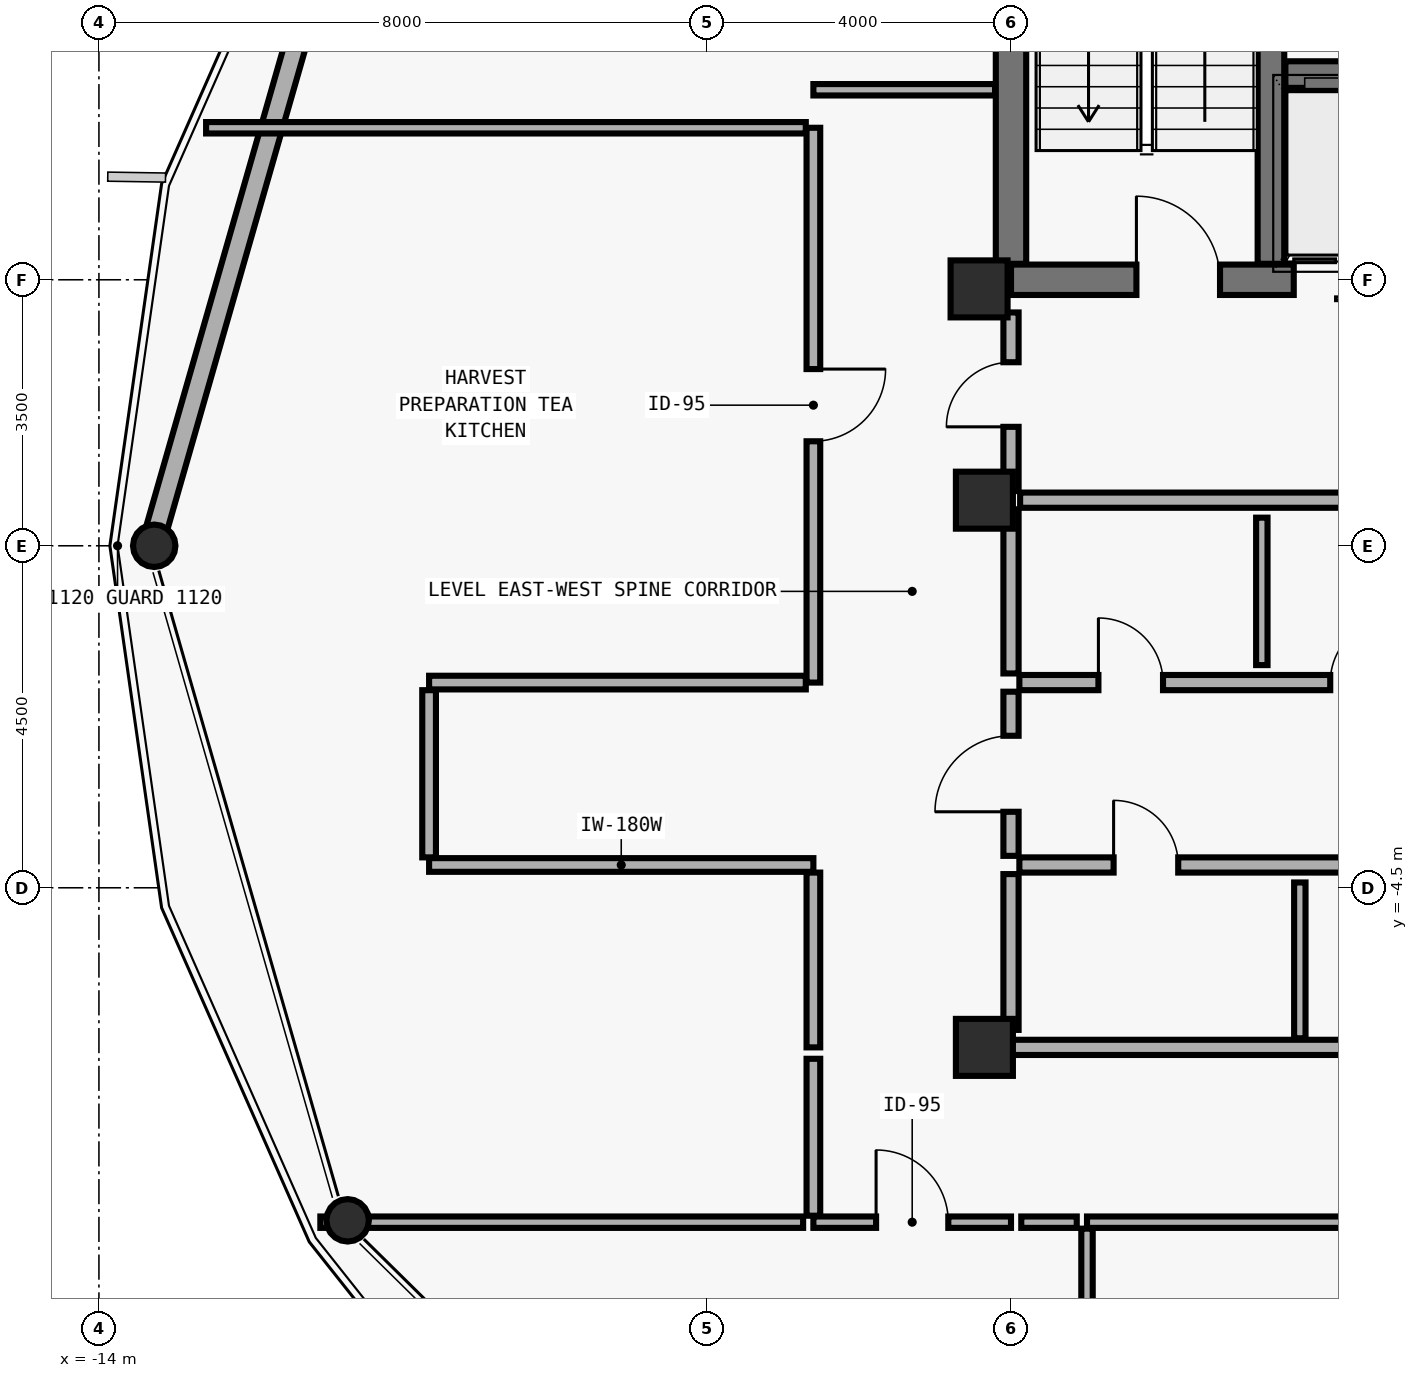
"""IFC4 building model, lengths in metres.
Left out: names, types, materials, properties, quantities, classifications, styles, units other than length and angle.
Written with IfcOpenShell. Run it as: python <this file> out.ifc"""

import sys

from ifc_helpers import new_model, si_unit, direction, frame, frame_2d, origin, origin_2d, place, context, subcontext, project, spatial, rectangle, hollow_circle, extrude, element, fill, save


model = new_model("IFC4")
c1 = context("Model", 3, precision=1e-05, world=origin(), true_north=direction((0.0, 1.0)))
c2 = subcontext(c1, "Body", "Model", "MODEL_VIEW")
j1 = project(units=[si_unit("LENGTHUNIT", "METRE"), si_unit("PLANEANGLEUNIT", "RADIAN")], contexts=[c1])
p1 = place(None, origin())
s1 = spatial("IfcSite", under=j1, at=p1, CompositionType="ELEMENT")
p2 = place(p1, origin())
s2 = spatial("IfcBuilding", under=s1, at=p2, CompositionType="ELEMENT")
p3 = place(p2, frame((0.0, 0.0, 267.0)))
s3 = spatial("IfcBuildingStorey", under=s2, at=p3, CompositionType="ELEMENT", Elevation=267.0)
p4 = place(p3, frame((-2.0, 3.5, 0.0), z_axis=(0.0, 0.0, 1.0), x_axis=(1.0, 0.0, 0.0)))
e1 = element("IfcWall", 1, at=p4, inside=s3, PredefinedType="SHEAR", context=c2, shape_type="SweptSolid", body=[
    extrude(rectangle(XDim=10.0, YDim=0.4, at=frame_2d((5.0, 0.0))), origin(), (0.0, 0.0, 1.0), 3.592),
])
p5 = place(p4, frame((1.65, 0.0, 0.0)))
e2 = element("IfcOpeningElement", 2, at=p5, cuts=e1, PredefinedType="OPENING", context=c2, shape_type="SweptSolid", body=[
    extrude(rectangle(XDim=1.1, YDim=2.15, at=frame_2d((0.55, 1.075))), frame((0.0, 0.21, 0.0), z_axis=(0.0, -1.0, 0.0), x_axis=(1.0, 0.0, 0.0)), (0.0, 0.0, 1.0), 0.42),
])
p6 = place(p4, frame((7.65, 0.0, 0.0)))
e3 = element("IfcOpeningElement", 3, at=p6, cuts=e1, PredefinedType="OPENING", context=c2, shape_type="SweptSolid", body=[
    extrude(rectangle(XDim=1.1, YDim=2.15, at=frame_2d((0.55, 1.075))), frame((0.0, 0.21, 0.0), z_axis=(0.0, -1.0, 0.0), x_axis=(1.0, 0.0, 0.0)), (0.0, 0.0, 1.0), 0.42),
])
p7 = place(p4, frame((3.72, 0.0, 0.0)))
e4 = element("IfcOpeningElement", 4, at=p7, cuts=e1, PredefinedType="OPENING", context=c2, shape_type="SweptSolid", body=[
    extrude(rectangle(XDim=1.1, YDim=2.2, at=frame_2d((0.55, 1.1))), frame((0.0, 0.21, 0.0), z_axis=(0.0, -1.0, 0.0), x_axis=(1.0, 0.0, 0.0)), (0.0, 0.0, 1.0), 0.42),
])
p8 = place(p4, frame((5.18, 0.0, 0.0)))
e5 = element("IfcOpeningElement", 5, at=p8, cuts=e1, PredefinedType="OPENING", context=c2, shape_type="SweptSolid", body=[
    extrude(rectangle(XDim=1.1, YDim=2.2, at=frame_2d((0.55, 1.1))), frame((0.0, 0.21, 0.0), z_axis=(0.0, -1.0, 0.0), x_axis=(1.0, 0.0, 0.0)), (0.0, 0.0, 1.0), 0.42),
])
p9 = place(p3, frame((-2.0, 3.71, 0.0), z_axis=(0.0, 0.0, 1.0), x_axis=(0.0, 1.0, 0.0)))
e6 = element("IfcWall", 6, at=p9, inside=s3, PredefinedType="SHEAR", context=c2, shape_type="SweptSolid", body=[
    extrude(rectangle(XDim=8.58, YDim=0.4, at=frame_2d((4.29, 0.0))), origin(), (0.0, 0.0, 1.0), 3.592),
])
p10 = place(p3, frame((1.42, 3.71, 0.0), z_axis=(0.0, 0.0, 1.0), x_axis=(0.0, 1.0, 0.0)))
e7 = element("IfcWall", 7, at=p10, inside=s3, PredefinedType="SHEAR", context=c2, shape_type="SweptSolid", body=[
    extrude(rectangle(XDim=8.58, YDim=0.35, at=frame_2d((4.29, 0.0))), origin(), (0.0, 0.0, 1.0), 3.592),
])
p11 = place(p3, frame((1.61, 6.2, 0.0), z_axis=(0.0, 0.0, 1.0), x_axis=(1.0, 0.0, 0.0)))
e8 = element("IfcWall", 8, at=p11, inside=s3, PredefinedType="SHEAR", context=c2, shape_type="SweptSolid", body=[
    extrude(rectangle(XDim=2.78, YDim=0.35, at=frame_2d((1.39, 0.0))), origin(), (0.0, 0.0, 1.0), 3.592),
])
for number, where, z_axis, x_axis in (
    (9, (-2.42, 3.38, 0.0), (0.0, 0.0, 1.0), (1.0, 0.0, 0.0)),
    (10, (-2.35, 0.6, 0.0), (0.0, 0.0, 1.0), (1.0, 0.0, 0.0)),
    (11, (-2.35, -6.6, 0.0), (0.0, 0.0, 1.0), (1.0, 0.0, 0.0)),
):
    element("IfcColumn", number, at=place(p3, frame(where, z_axis=z_axis, x_axis=x_axis)), inside=s3, PredefinedType="COLUMN", context=c2, shape_type="SweptSolid", body=[
        extrude(rectangle(XDim=0.75, YDim=0.75, at=origin_2d()), origin(), (0.0, 0.0, 1.0), 3.575),
    ])
p12 = place(p3, frame((-13.306, 0.0, 0.0), z_axis=(0.018708737519, 0.0, 0.999824976254), x_axis=(0.0, 1.0, 0.0)))
e12 = element("IfcColumn", 12, at=p12, inside=s3, PredefinedType="COLUMN", context=c2, shape_type="SweptSolid", body=[
    extrude(hollow_circle(Radius=0.28, WallThickness=0.02, at=origin_2d()), origin(), (0.0, 0.0, 1.0), 3.576),
])
p13 = place(p3, frame((-10.757, -8.884, 0.0), z_axis=(0.016251167856, 0.004779755252, 0.999856516448), x_axis=(-0.282166323992, 0.959365501571, 0.0)))
e13 = element("IfcColumn", 13, at=p13, inside=s3, PredefinedType="COLUMN", context=c2, shape_type="SweptSolid", body=[
    extrude(hollow_circle(Radius=0.28, WallThickness=0.02, at=origin_2d()), origin(), (0.0, 0.0, 1.0), 3.575),
])
p14 = place(p3, frame((-13.241, 0.225, 0.0), z_axis=(0.0, 0.0, 1.0), x_axis=(0.275816158288, 0.961210407157, 0.0)))
e14 = element("IfcWall", 14, at=p14, inside=s3, PredefinedType="SOLIDWALL", context=c2, shape_type="SweptSolid", body=[
    extrude(rectangle(XDim=8.774, YDim=0.28, at=frame_2d((4.387, 0.0))), origin(), (0.0, 0.0, 1.0), 2.97),
])
p15 = place(p3, frame((-2.0, 0.72, 0.0), z_axis=(0.0, 0.0, 1.0), x_axis=(0.0, 1.0, 0.0)))
e15 = element("IfcWall", 15, at=p15, inside=s3, PredefinedType="MOVABLE", context=c2, shape_type="SweptSolid", body=[
    extrude(rectangle(XDim=2.35, YDim=0.2, at=frame_2d((1.175, 0.0))), origin(), (0.0, 0.0, 1.0), 2.692),
])
p16 = place(p15, frame((0.845, 0.0, 0.0)))
e16 = element("IfcOpeningElement", 16, at=p16, cuts=e15, PredefinedType="OPENING", context=c2, shape_type="SweptSolid", body=[
    extrude(rectangle(XDim=0.85, YDim=2.1, at=frame_2d((0.425, 1.05))), frame((0.0, 0.11, 0.0), z_axis=(0.0, -1.0, 0.0), x_axis=(1.0, 0.0, 0.0)), (0.0, 0.0, 1.0), 0.22),
])
p17 = place(p3, frame((-2.0, -4.08, 0.0), z_axis=(0.0, 0.0, 1.0), x_axis=(0.0, 1.0, 0.0)))
e17 = element("IfcWall", 17, at=p17, inside=s3, PredefinedType="MOVABLE", context=c2, shape_type="SweptSolid", body=[
    extrude(rectangle(XDim=2.16, YDim=0.2, at=frame_2d((1.08, 0.0))), origin(), (0.0, 0.0, 1.0), 3.072),
])
p18 = place(p17, frame((0.58, 0.0, 0.0)))
e18 = element("IfcOpeningElement", 18, at=p18, cuts=e17, PredefinedType="OPENING", context=c2, shape_type="SweptSolid", body=[
    extrude(rectangle(XDim=1.0, YDim=2.1, at=frame_2d((0.5, 1.05))), frame((0.0, 0.11, 0.0), z_axis=(0.0, -1.0, 0.0), x_axis=(1.0, 0.0, 0.0)), (0.0, 0.0, 1.0), 0.22),
])
p19 = place(p3, frame((-1.89, -1.8, 0.0), z_axis=(0.0, 0.0, 1.0), x_axis=(1.0, 0.0, 0.0)))
e19 = element("IfcWall", 19, at=p19, inside=s3, PredefinedType="MOVABLE", context=c2, shape_type="SweptSolid", body=[
    extrude(rectangle(XDim=5.73, YDim=0.2, at=frame_2d((2.865, 0.0))), origin(), (0.0, 0.0, 1.0), 3.36),
])
p20 = place(p19, frame((1.04, 0.0, 0.0)))
e20 = element("IfcOpeningElement", 20, at=p20, cuts=e19, PredefinedType="OPENING", context=c2, shape_type="SweptSolid", body=[
    extrude(rectangle(XDim=0.85, YDim=2.1, at=frame_2d((0.425, 1.05))), frame((0.0, 0.11, 0.0), z_axis=(0.0, -1.0, 0.0), x_axis=(1.0, 0.0, 0.0)), (0.0, 0.0, 1.0), 0.22),
])
p21 = place(p19, frame((4.09, 0.0, 0.0)))
e21 = element("IfcOpeningElement", 21, at=p21, cuts=e19, PredefinedType="OPENING", context=c2, shape_type="SweptSolid", body=[
    extrude(rectangle(XDim=0.85, YDim=2.1, at=frame_2d((0.425, 1.05))), frame((0.0, 0.11, 0.0), z_axis=(0.0, -1.0, 0.0), x_axis=(1.0, 0.0, 0.0)), (0.0, 0.0, 1.0), 0.22),
])
p22 = place(p3, frame((-1.89, -4.2, 0.0), z_axis=(0.0, 0.0, 1.0), x_axis=(1.0, 0.0, 0.0)))
e22 = element("IfcWall", 22, at=p22, inside=s3, PredefinedType="MOVABLE", context=c2, shape_type="SweptSolid", body=[
    extrude(rectangle(XDim=5.73, YDim=0.2, at=frame_2d((2.865, 0.0))), origin(), (0.0, 0.0, 1.0), 3.36),
])
p23 = place(p22, frame((1.24, 0.0, 0.0)))
e23 = element("IfcOpeningElement", 23, at=p23, cuts=e22, PredefinedType="OPENING", context=c2, shape_type="SweptSolid", body=[
    extrude(rectangle(XDim=0.85, YDim=2.1, at=frame_2d((0.425, 1.05))), frame((0.0, 0.11, 0.0), z_axis=(0.0, -1.0, 0.0), x_axis=(1.0, 0.0, 0.0)), (0.0, 0.0, 1.0), 0.22),
])
p24 = place(p22, frame((4.34, 0.0, 0.0)))
e24 = element("IfcOpeningElement", 24, at=p24, cuts=e22, PredefinedType="OPENING", context=c2, shape_type="SweptSolid", body=[
    extrude(rectangle(XDim=0.85, YDim=2.1, at=frame_2d((0.425, 1.05))), frame((0.0, 0.11, 0.0), z_axis=(0.0, -1.0, 0.0), x_axis=(1.0, 0.0, 0.0)), (0.0, 0.0, 1.0), 0.22),
])
p25 = place(p3, frame((-4.6, -8.9, 0.0), z_axis=(0.0, 0.0, 1.0), x_axis=(1.0, 0.0, 0.0)))
e25 = element("IfcWall", 25, at=p25, inside=s3, PredefinedType="PARTITIONING", context=c2, shape_type="SweptSolid", body=[
    extrude(rectangle(XDim=2.6, YDim=0.15, at=frame_2d((1.3, 0.0))), origin(), (0.0, 0.0, 1.0), 3.36),
])
p26 = place(p25, frame((0.825, 0.0, 0.0)))
e26 = element("IfcOpeningElement", 26, at=p26, cuts=e25, PredefinedType="OPENING", context=c2, shape_type="SweptSolid", body=[
    extrude(rectangle(XDim=0.95, YDim=2.1, at=frame_2d((0.475, 1.05))), frame((0.0, 0.085, 0.0), z_axis=(0.0, -1.0, 0.0), x_axis=(1.0, 0.0, 0.0)), (0.0, 0.0, 1.0), 0.17),
])
p27 = place(p3, frame((-1.0, -8.9, 0.0), z_axis=(0.0, 0.0, 1.0), x_axis=(1.0, 0.0, 0.0)))
e27 = element("IfcWall", 27, at=p27, inside=s3, PredefinedType="PARTITIONING", context=c2, shape_type="SweptSolid", body=[
    extrude(rectangle(XDim=8.5, YDim=0.15, at=frame_2d((4.25, 0.0))), origin(), (0.0, 0.0, 1.0), 3.36),
])
p28 = place(p27, frame((3.775, 0.0, 0.0)))
e28 = element("IfcOpeningElement", 28, at=p28, cuts=e27, PredefinedType="OPENING", context=c2, shape_type="SweptSolid", body=[
    extrude(rectangle(XDim=0.95, YDim=2.1, at=frame_2d((0.475, 1.05))), frame((0.0, 0.085, 0.0), z_axis=(0.0, -1.0, 0.0), x_axis=(1.0, 0.0, 0.0)), (0.0, 0.0, 1.0), 0.17),
])
p29 = place(p3, frame((-4.6, 5.5, 0.0), z_axis=(0.0, 0.0, 1.0), x_axis=(0.0, -1.0, 0.0)))
e29 = element("IfcWall", 29, at=p29, inside=s3, PredefinedType="PLUMBINGWALL", context=c2, shape_type="SweptSolid", body=[
    extrude(rectangle(XDim=7.3, YDim=0.18, at=frame_2d((3.65, 0.0))), origin(), (0.0, 0.0, 1.0), 3.36),
])
p30 = place(p29, frame((3.175, 0.0, 0.0)))
e30 = element("IfcOpeningElement", 30, at=p30, cuts=e29, PredefinedType="OPENING", context=c2, shape_type="SweptSolid", body=[
    extrude(rectangle(XDim=0.95, YDim=2.1, at=frame_2d((0.475, 1.05))), frame((0.0, 0.1, 0.0), z_axis=(0.0, -1.0, 0.0), x_axis=(1.0, 0.0, 0.0)), (0.0, 0.0, 1.0), 0.2),
])
p31 = place(p3, frame((-1.88, 0.6, 0.0), z_axis=(0.0, 0.0, 1.0), x_axis=(1.0, 0.0, 0.0)))
e31 = element("IfcWall", 31, at=p31, inside=s3, PredefinedType="MOVABLE", context=c2, shape_type="SweptSolid", body=[
    extrude(rectangle(XDim=5.72, YDim=0.2, at=frame_2d((2.86, 0.0))), origin(), (0.0, 0.0, 1.0), 3.072),
])
p32 = place(p3, frame((1.3, -1.57, 0.0), z_axis=(0.0, 0.0, 1.0), x_axis=(0.0, 1.0, 0.0)))
e32 = element("IfcWall", 32, at=p32, inside=s3, PredefinedType="PARTITIONING", context=c2, shape_type="SweptSolid", body=[
    extrude(rectangle(XDim=1.94, YDim=0.15, at=frame_2d((0.97, 0.0))), origin(), (0.0, 0.0, 1.0), 3.36),
])
p33 = place(p3, frame((-2.0, -1.68, 0.0), z_axis=(0.0, 0.0, 1.0), x_axis=(0.0, 1.0, 0.0)))
e33 = element("IfcWall", 33, at=p33, inside=s3, PredefinedType="MOVABLE", context=c2, shape_type="SweptSolid", body=[
    extrude(rectangle(XDim=2.16, YDim=0.2, at=frame_2d((1.08, 0.0))), origin(), (0.0, 0.0, 1.0), 3.072),
])
p34 = place(p3, frame((1.8, -6.48, 0.0), z_axis=(0.0, 0.0, 1.0), x_axis=(0.0, 1.0, 0.0)))
e34 = element("IfcWall", 34, at=p34, inside=s3, PredefinedType="PARTITIONING", context=c2, shape_type="SweptSolid", body=[
    extrude(rectangle(XDim=2.05, YDim=0.15, at=frame_2d((1.025, 0.0))), origin(), (0.0, 0.0, 1.0), 3.36),
])
p35 = place(p3, frame((-2.0, -6.6, 0.0), z_axis=(0.0, 0.0, 1.0), x_axis=(1.0, 0.0, 0.0)))
e35 = element("IfcWall", 35, at=p35, inside=s3, PredefinedType="MOVABLE", context=c2, shape_type="SweptSolid", body=[
    extrude(rectangle(XDim=5.84, YDim=0.2, at=frame_2d((2.92, 0.0))), origin(), (0.0, 0.0, 1.0), 3.072),
])
p36 = place(p3, frame((-2.0, -6.37, 0.0), z_axis=(0.0, 0.0, 1.0), x_axis=(0.0, 1.0, 0.0)))
e36 = element("IfcWall", 36, at=p36, inside=s3, PredefinedType="MOVABLE", context=c2, shape_type="SweptSolid", body=[
    extrude(rectangle(XDim=2.05, YDim=0.2, at=frame_2d((1.025, 0.0))), origin(), (0.0, 0.0, 1.0), 3.072),
])
p37 = place(p3, frame((-1.865, -8.9, 0.0), z_axis=(0.0, 0.0, 1.0), x_axis=(1.0, 0.0, 0.0)))
e37 = element("IfcWall", 37, at=p37, inside=s3, PredefinedType="PARTITIONING", context=c2, shape_type="SweptSolid", body=[
    extrude(rectangle(XDim=0.73, YDim=0.15, at=frame_2d((0.365, 0.0))), origin(), (0.0, 0.0, 1.0), 3.36),
])
p38 = place(p3, frame((-1.0, -8.985, 0.0), z_axis=(0.0, 0.0, 1.0), x_axis=(0.0, -1.0, 0.0)))
e38 = element("IfcWall", 38, at=p38, inside=s3, PredefinedType="PARTITIONING", context=c2, shape_type="SweptSolid", body=[
    extrude(rectangle(XDim=8.098, YDim=0.15, at=frame_2d((4.049, 0.0))), origin(), (0.0, 0.0, 1.0), 3.36),
])
p39 = place(p3, frame((-11.087, -8.9, 0.0), z_axis=(0.0, 0.0, 1.0), x_axis=(1.0, 0.0, 0.0)))
e39 = element("IfcWall", 39, at=p39, inside=s3, PredefinedType="PARTITIONING", context=c2, shape_type="SweptSolid", body=[
    extrude(rectangle(XDim=6.352, YDim=0.15, at=frame_2d((3.176, 0.0))), origin(), (0.0, 0.0, 1.0), 2.892),
])
p40 = place(p3, frame((-4.7, -1.8, 0.0), z_axis=(0.0, 0.0, 1.0), x_axis=(-1.0, 0.0, 0.0)))
e40 = element("IfcWall", 40, at=p40, inside=s3, PredefinedType="PLUMBINGWALL", context=c2, shape_type="SweptSolid", body=[
    extrude(rectangle(XDim=4.956, YDim=0.18, at=frame_2d((2.478, 0.0))), origin(), (0.0, 0.0, 1.0), 3.36),
])
p41 = place(p3, frame((-9.656, -4.2, 0.0), z_axis=(0.0, 0.0, 1.0), x_axis=(1.0, 0.0, 0.0)))
e41 = element("IfcWall", 41, at=p41, inside=s3, PredefinedType="PLUMBINGWALL", context=c2, shape_type="SweptSolid", body=[
    extrude(rectangle(XDim=5.056, YDim=0.18, at=frame_2d((2.528, 0.0))), origin(), (0.0, 0.0, 1.0), 3.36),
])
p42 = place(p3, frame((-9.656, -1.9, 0.0), z_axis=(0.0, 0.0, 1.0), x_axis=(0.0, -1.0, 0.0)))
e42 = element("IfcWall", 42, at=p42, inside=s3, PredefinedType="PLUMBINGWALL", context=c2, shape_type="SweptSolid", body=[
    extrude(rectangle(XDim=2.2, YDim=0.18, at=frame_2d((1.1, 0.0))), origin(), (0.0, 0.0, 1.0), 3.36),
])
p43 = place(p3, frame((-4.6, -4.3, 0.0), z_axis=(0.0, 0.0, 1.0), x_axis=(0.0, -1.0, 0.0)))
e43 = element("IfcWall", 43, at=p43, inside=s3, PredefinedType="PLUMBINGWALL", context=c2, shape_type="SweptSolid", body=[
    extrude(rectangle(XDim=2.3, YDim=0.18, at=frame_2d((1.15, 0.0))), origin(), (0.0, 0.0, 1.0), 3.36),
])
p44 = place(p3, frame((-4.6, -6.75, 0.0), z_axis=(0.0, 0.0, 1.0), x_axis=(0.0, -1.0, 0.0)))
e44 = element("IfcWall", 44, at=p44, inside=s3, PredefinedType="PLUMBINGWALL", context=c2, shape_type="SweptSolid", body=[
    extrude(rectangle(XDim=2.065, YDim=0.18, at=frame_2d((1.032, 0.0))), origin(), (0.0, 0.0, 1.0), 3.36),
])
p45 = place(p3, frame((-12.59, 5.5, 0.0), z_axis=(0.0, 0.0, 1.0), x_axis=(1.0, 0.0, 0.0)))
e45 = element("IfcWall", 45, at=p45, inside=s3, PredefinedType="PARTITIONING", context=c2, shape_type="SweptSolid", body=[
    extrude(rectangle(XDim=7.89, YDim=0.15, at=frame_2d((3.945, 0.0))), origin(), (0.0, 0.0, 1.0), 3.36),
])
p46 = place(p3, frame((-2.21, 6.0, 0.0), z_axis=(0.0, 0.0, 1.0), x_axis=(-1.0, 0.0, 0.0)))
e46 = element("IfcWall", 46, at=p46, inside=s3, PredefinedType="PARTITIONING", context=c2, shape_type="SweptSolid", body=[
    extrude(rectangle(XDim=2.39, YDim=0.15, at=frame_2d((1.195, 0.0))), origin(), (0.0, 0.0, 1.0), 3.36),
])
p47 = place(p5, origin())
e47 = element("IfcDoor", 47, at=p47, inside=s3, OperationType="SINGLE_SWING_LEFT", PredefinedType="DOOR", context=c2, shape_type="SweptSolid", body=[
    extrude(rectangle(XDim=1.1, YDim=2.15, at=frame_2d((0.55, 1.075))), frame((0.0, 0.025, 0.0), z_axis=(0.0, -1.0, 0.0), x_axis=(1.0, 0.0, 0.0)), (0.0, 0.0, 1.0), 0.05),
])
fill(e2, e47)
p48 = place(p7, origin())
e48 = element("IfcDoor", 48, at=p48, inside=s3, OperationType="DOUBLE_DOOR_SLIDING", PredefinedType="DOOR", context=c2, shape_type="SweptSolid", body=[
    extrude(rectangle(XDim=1.1, YDim=2.2, at=frame_2d((0.55, 1.1))), frame((0.0, 0.025, 0.0), z_axis=(0.0, -1.0, 0.0), x_axis=(1.0, 0.0, 0.0)), (0.0, 0.0, 1.0), 0.05),
])
fill(e4, e48)
p49 = place(p16, origin())
e49 = element("IfcDoor", 49, at=p49, inside=s3, OperationType="SINGLE_SWING_LEFT", PredefinedType="DOOR", context=c2, shape_type="SweptSolid", body=[
    extrude(rectangle(XDim=0.85, YDim=2.1, at=frame_2d((0.425, 1.05))), frame((0.0, 0.025, 0.0), z_axis=(0.0, -1.0, 0.0), x_axis=(1.0, 0.0, 0.0)), (0.0, 0.0, 1.0), 0.05),
])
fill(e16, e49)
p50 = place(p18, origin())
e50 = element("IfcDoor", 50, at=p50, inside=s3, OperationType="SINGLE_SWING_LEFT", PredefinedType="DOOR", context=c2, shape_type="SweptSolid", body=[
    extrude(rectangle(XDim=1.0, YDim=2.1, at=frame_2d((0.5, 1.05))), frame((0.0, 0.025, 0.0), z_axis=(0.0, -1.0, 0.0), x_axis=(1.0, 0.0, 0.0)), (0.0, 0.0, 1.0), 0.05),
])
fill(e18, e50)
p51 = place(p20, origin())
e51 = element("IfcDoor", 51, at=p51, inside=s3, OperationType="SINGLE_SWING_LEFT", PredefinedType="DOOR", context=c2, shape_type="SweptSolid", body=[
    extrude(rectangle(XDim=0.85, YDim=2.1, at=frame_2d((0.425, 1.05))), frame((0.0, 0.025, 0.0), z_axis=(0.0, -1.0, 0.0), x_axis=(1.0, 0.0, 0.0)), (0.0, 0.0, 1.0), 0.05),
])
fill(e20, e51)
p52 = place(p21, origin())
e52 = element("IfcDoor", 52, at=p52, inside=s3, OperationType="SINGLE_SWING_RIGHT", PredefinedType="DOOR", context=c2, shape_type="SweptSolid", body=[
    extrude(rectangle(XDim=0.85, YDim=2.1, at=frame_2d((0.425, 1.05))), frame((0.0, 0.025, 0.0), z_axis=(0.0, -1.0, 0.0), x_axis=(1.0, 0.0, 0.0)), (0.0, 0.0, 1.0), 0.05),
])
fill(e21, e52)
p53 = place(p23, origin())
e53 = element("IfcDoor", 53, at=p53, inside=s3, OperationType="SINGLE_SWING_LEFT", PredefinedType="DOOR", context=c2, shape_type="SweptSolid", body=[
    extrude(rectangle(XDim=0.85, YDim=2.1, at=frame_2d((0.425, 1.05))), frame((0.0, 0.025, 0.0), z_axis=(0.0, -1.0, 0.0), x_axis=(1.0, 0.0, 0.0)), (0.0, 0.0, 1.0), 0.05),
])
fill(e23, e53)
p54 = place(p26, origin())
e54 = element("IfcDoor", 54, at=p54, inside=s3, OperationType="SINGLE_SWING_LEFT", PredefinedType="DOOR", context=c2, shape_type="SweptSolid", body=[
    extrude(rectangle(XDim=0.95, YDim=2.1, at=frame_2d((0.475, 1.05))), frame((0.0, 0.025, 0.0), z_axis=(0.0, -1.0, 0.0), x_axis=(1.0, 0.0, 0.0)), (0.0, 0.0, 1.0), 0.05),
])
fill(e26, e54)
p55 = place(p30, origin())
e55 = element("IfcDoor", 55, at=p55, inside=s3, OperationType="SINGLE_SWING_LEFT", PredefinedType="DOOR", context=c2, shape_type="SweptSolid", body=[
    extrude(rectangle(XDim=0.95, YDim=2.1, at=frame_2d((0.475, 1.05))), frame((0.0, 0.025, 0.0), z_axis=(0.0, -1.0, 0.0), x_axis=(1.0, 0.0, 0.0)), (0.0, 0.0, 1.0), 0.05),
])
fill(e30, e55)
save(model, sys.argv[1])
